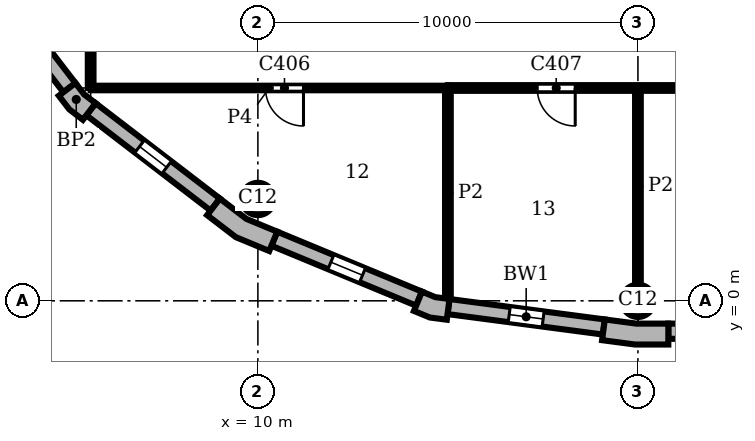
"""IFC4 building model, lengths in metres.
Left out: names, types, materials, properties, quantities, classifications, styles, units other than length and angle.
Written with IfcOpenShell. Run it as: python <this file> out.ifc"""

import sys

from ifc_helpers import new_model, si_unit, direction, frame, frame_2d, origin, origin_2d, place, context, subcontext, project, spatial, polyline, rectangle, circle, outline, extrude, element, fill, save


model = new_model("IFC4")
c1 = context("Model", 3, precision=1e-05, world=origin(), true_north=direction((0.0, 1.0)))
c2 = subcontext(c1, "Body", "Model", "MODEL_VIEW")
j1 = project(units=[si_unit("LENGTHUNIT", "METRE"), si_unit("PLANEANGLEUNIT", "RADIAN")], contexts=[c1])
p1 = place(None, origin())
s1 = spatial("IfcSite", under=j1, at=p1, CompositionType="ELEMENT")
p2 = place(p1, origin())
s2 = spatial("IfcBuilding", under=s1, at=p2, CompositionType="ELEMENT")
p3 = place(p2, frame((0.0, 0.0, 278.7)))
s3 = spatial("IfcBuildingStorey", under=s2, at=p3, CompositionType="ELEMENT", Elevation=278.7)
for number, where, z_axis, x_axis in (
    (1, (20.0, 0.0, 0.0), (0.0, 0.0, 1.0), (1.0, 0.0, 0.0)),
    (2, (10.0, 2.679, 0.0), (0.0, 0.0, 1.0), (1.0, 0.0, 0.0)),
):
    element("IfcColumn", number, at=place(p3, frame(where, z_axis=z_axis, x_axis=x_axis)), inside=s3, PredefinedType="COLUMN", context=c2, shape_type="SweptSolid", body=[
        extrude(circle(Radius=0.425, at=origin_2d()), origin(), (0.0, 0.0, 1.0), 3.9),
    ])
p4 = place(p3, origin())
e3 = element("IfcWall", 3, at=p4, inside=s3, PredefinedType="SOLIDWALL", context=c2, shape_type="SweptSolid", body=[
    extrude(outline(polyline([(19.076, -0.887), (19.057, -1.036), (19.925, -1.15), (20.8, -1.15), (20.8, -1.0), (20.8, -0.6), (19.961, -0.6), (19.128, -0.49), (19.076, -0.887)])), origin(), (0.0, 0.0, 1.0), 3.9),
])
e4 = element("IfcWall", 4, at=p4, inside=s3, PredefinedType="SOLIDWALL", context=c2, shape_type="SweptSolid", body=[
    extrude(outline(polyline([(4.882, 5.487), (4.763, 5.396), (5.038, 5.038), (5.396, 4.763), (5.487, 4.882), (5.731, 5.199), (5.43, 5.43), (5.199, 5.731), (4.882, 5.487)])), origin(), (0.0, 0.0, 1.0), 3.9),
])
e5 = element("IfcWall", 5, at=p4, inside=s3, PredefinedType="SOLIDWALL", context=c2, shape_type="SweptSolid", body=[
    extrude(outline(polyline([(8.757, 2.373), (8.665, 2.254), (9.42, 1.675), (10.299, 1.311), (10.356, 1.449), (10.51, 1.819), (9.698, 2.155), (9.0, 2.69), (8.757, 2.373)])), origin(), (0.0, 0.0, 1.0), 3.9),
])
e6 = element("IfcWall", 6, at=p4, inside=s3, PredefinedType="SOLIDWALL", context=c2, shape_type="SweptSolid", body=[
    extrude(outline(polyline([(14.164, -0.128), (14.106, -0.266), (14.523, -0.439), (14.971, -0.498), (14.99, -0.349), (15.043, 0.047), (14.667, 0.097), (14.317, 0.242), (14.164, -0.128)])), origin(), (0.0, 0.0, 1.0), 3.9),
])
p5 = place(p3, frame((20.8, -0.8, 0.0), z_axis=(0.0, 0.0, 1.0), x_axis=(1.0, 0.0, 0.0)))
e7 = element("IfcWall", 7, at=p5, inside=s3, PredefinedType="SOLIDWALL", context=c2, shape_type="SweptSolid", body=[
    extrude(rectangle(XDim=18.4, YDim=0.4, at=frame_2d((9.2, 0.0))), origin(), (0.0, 0.0, 1.0), 3.9),
])
p6 = place(p5, frame((3.75, 0.0, 0.9)))
e8 = element("IfcOpeningElement", 8, at=p6, cuts=e7, PredefinedType="OPENING", context=c2, shape_type="SweptSolid", body=[
    extrude(rectangle(XDim=0.9, YDim=2.35, at=frame_2d((0.45, 1.175))), frame((0.0, 0.21, 0.0), z_axis=(0.0, -1.0, 0.0), x_axis=(1.0, 0.0, 0.0)), (0.0, 0.0, 1.0), 0.42),
])
p7 = place(p5, frame((13.75, 0.0, 0.9)))
e9 = element("IfcOpeningElement", 9, at=p7, cuts=e7, PredefinedType="OPENING", context=c2, shape_type="SweptSolid", body=[
    extrude(rectangle(XDim=0.9, YDim=2.35, at=frame_2d((0.45, 1.175))), frame((0.0, 0.21, 0.0), z_axis=(0.0, -1.0, 0.0), x_axis=(1.0, 0.0, 0.0)), (0.0, 0.0, 1.0), 0.42),
])
p8 = place(p3, frame((2.532, 8.878, 0.0), z_axis=(0.0, 0.0, 1.0), x_axis=(0.608759824817, -0.793354571229, 0.0)))
e10 = element("IfcWall", 10, at=p8, inside=s3, PredefinedType="SOLIDWALL", context=c2, shape_type="SweptSolid", body=[
    extrude(rectangle(XDim=4.121, YDim=0.4, at=frame_2d((2.061, 0.0))), origin(), (0.0, 0.0, 1.0), 3.9),
])
p9 = place(p8, frame((1.611, 0.0, 0.9)))
e11 = element("IfcOpeningElement", 11, at=p9, cuts=e10, PredefinedType="OPENING", context=c2, shape_type="SweptSolid", body=[
    extrude(rectangle(XDim=0.9, YDim=2.35, at=frame_2d((0.45, 1.175))), frame((0.0, 0.21, 0.0), z_axis=(0.0, -1.0, 0.0), x_axis=(1.0, 0.0, 0.0)), (0.0, 0.0, 1.0), 0.42),
])
p10 = place(p3, frame((5.609, 5.041, 0.0), z_axis=(0.0, 0.0, 1.0), x_axis=(0.793354571229, -0.608759824817, 0.0)))
e12 = element("IfcWall", 12, at=p10, inside=s3, PredefinedType="SOLIDWALL", context=c2, shape_type="SweptSolid", body=[
    extrude(rectangle(XDim=4.121, YDim=0.4, at=frame_2d((2.061, 0.0))), origin(), (0.0, 0.0, 1.0), 3.9),
])
p11 = place(p10, frame((1.611, 0.0, 0.9)))
e13 = element("IfcOpeningElement", 13, at=p11, cuts=e12, PredefinedType="OPENING", context=c2, shape_type="SweptSolid", body=[
    extrude(rectangle(XDim=0.9, YDim=2.35, at=frame_2d((0.45, 1.175))), frame((0.0, 0.21, 0.0), z_axis=(0.0, -1.0, 0.0), x_axis=(1.0, 0.0, 0.0)), (0.0, 0.0, 1.0), 0.42),
])
p12 = place(p3, frame((10.433, 1.634, 0.0), z_axis=(0.0, 0.0, 1.0), x_axis=(0.923863744394, -0.382721546029, 0.0)))
e14 = element("IfcWall", 14, at=p12, inside=s3, PredefinedType="SOLIDWALL", context=c2, shape_type="SweptSolid", body=[
    extrude(rectangle(XDim=4.121, YDim=0.4, at=frame_2d((2.061, 0.0))), origin(), (0.0, 0.0, 1.0), 3.9),
])
p13 = place(p12, frame((1.611, 0.0, 0.9)))
e15 = element("IfcOpeningElement", 15, at=p13, cuts=e14, PredefinedType="OPENING", context=c2, shape_type="SweptSolid", body=[
    extrude(rectangle(XDim=0.9, YDim=2.35, at=frame_2d((0.45, 1.175))), frame((0.0, 0.21, 0.0), z_axis=(0.0, -1.0, 0.0), x_axis=(1.0, 0.0, 0.0)), (0.0, 0.0, 1.0), 0.42),
])
p14 = place(p3, frame((15.017, -0.151, 0.0), z_axis=(0.0, 0.0, 1.0), x_axis=(0.991446429508, -0.130514280502, 0.0)))
e16 = element("IfcWall", 16, at=p14, inside=s3, PredefinedType="SOLIDWALL", context=c2, shape_type="SweptSolid", body=[
    extrude(rectangle(XDim=4.121, YDim=0.4, at=frame_2d((2.061, 0.0))), origin(), (0.0, 0.0, 1.0), 3.9),
])
p15 = place(p14, frame((1.611, 0.0, 0.9)))
e17 = element("IfcOpeningElement", 17, at=p15, cuts=e16, PredefinedType="OPENING", context=c2, shape_type="SweptSolid", body=[
    extrude(rectangle(XDim=0.9, YDim=2.35, at=frame_2d((0.45, 1.175))), frame((0.0, 0.21, 0.0), z_axis=(0.0, -1.0, 0.0), x_axis=(1.0, 0.0, 0.0)), (0.0, 0.0, 1.0), 0.42),
])
p16 = place(p3, frame((5.6, 5.6, 0.0), z_axis=(0.0, 0.0, 1.0), x_axis=(0.0, 1.0, 0.0)))
e18 = element("IfcWall", 18, at=p16, inside=s3, PredefinedType="PARTITIONING", context=c2, shape_type="SweptSolid", body=[
    extrude(rectangle(XDim=14.4, YDim=0.15, at=frame_2d((7.2, 0.0))), origin(), (0.0, 0.0, 1.0), 3.58),
])
p17 = place(p16, frame((3.6, 0.0, 0.0)))
e19 = element("IfcOpeningElement", 19, at=p17, cuts=e18, PredefinedType="OPENING", context=c2, shape_type="SweptSolid", body=[
    extrude(rectangle(XDim=1.0, YDim=2.1, at=frame_2d((0.5, 1.05))), frame((0.0, 0.085, 0.0), z_axis=(0.0, -1.0, 0.0), x_axis=(1.0, 0.0, 0.0)), (0.0, 0.0, 1.0), 0.17),
])
p18 = place(p16, frame((11.25, 0.0, 0.0)))
e20 = element("IfcOpeningElement", 20, at=p18, cuts=e18, PredefinedType="OPENING", context=c2, shape_type="SweptSolid", body=[
    extrude(rectangle(XDim=0.8, YDim=2.1, at=frame_2d((0.4, 1.05))), frame((0.0, 0.085, 0.0), z_axis=(0.0, -1.0, 0.0), x_axis=(1.0, 0.0, 0.0)), (0.0, 0.0, 1.0), 0.17),
])
p19 = place(p3, frame((15.0, 0.063, 0.0), z_axis=(0.0, 0.0, 1.0), x_axis=(0.0, 1.0, 0.0)))
e21 = element("IfcWall", 21, at=p19, inside=s3, PredefinedType="PARTITIONING", context=c2, shape_type="SweptSolid", body=[
    extrude(rectangle(XDim=5.537, YDim=0.15, at=frame_2d((2.769, 0.0))), origin(), (0.0, 0.0, 1.0), 3.58),
])
p20 = place(p3, frame((20.0, 0.425, 0.0), z_axis=(0.0, 0.0, 1.0), x_axis=(0.0, 1.0, 0.0)))
e22 = element("IfcWall", 22, at=p20, inside=s3, PredefinedType="PARTITIONING", context=c2, shape_type="SweptSolid", body=[
    extrude(rectangle(XDim=5.175, YDim=0.15, at=frame_2d((2.587, 0.0))), origin(), (0.0, 0.0, 1.0), 3.58),
])
p21 = place(p3, frame((15.0, 5.6, 0.0), z_axis=(0.0, 0.0, 1.0), x_axis=(1.0, 0.0, 0.0)))
e23 = element("IfcWall", 23, at=p21, inside=s3, PredefinedType="PARTITIONING", context=c2, shape_type="SweptSolid", body=[
    extrude(rectangle(XDim=16.0, YDim=0.15, at=frame_2d((8.0, 0.0))), origin(), (0.0, 0.0, 1.0), 3.58),
])
p22 = place(p21, frame((2.35, 0.0, 0.0)))
e24 = element("IfcOpeningElement", 24, at=p22, cuts=e23, PredefinedType="OPENING", context=c2, shape_type="SweptSolid", body=[
    extrude(rectangle(XDim=1.0, YDim=2.1, at=frame_2d((0.5, 1.05))), frame((0.0, 0.085, 0.0), z_axis=(0.0, -1.0, 0.0), x_axis=(1.0, 0.0, 0.0)), (0.0, 0.0, 1.0), 0.17),
])
p23 = place(p3, frame((5.6, 5.6, 0.0), z_axis=(0.0, 0.0, 1.0), x_axis=(1.0, 0.0, 0.0)))
e25 = element("IfcWall", 25, at=p23, inside=s3, PredefinedType="PARTITIONING", context=c2, shape_type="SweptSolid", body=[
    extrude(rectangle(XDim=9.4, YDim=0.12, at=frame_2d((4.7, 0.0))), origin(), (0.0, 0.0, 1.0), 3.58),
])
p24 = place(p23, frame((4.6, 0.0, 0.0)))
e26 = element("IfcOpeningElement", 26, at=p24, cuts=e25, PredefinedType="OPENING", context=c2, shape_type="SweptSolid", body=[
    extrude(rectangle(XDim=1.0, YDim=2.1, at=frame_2d((0.5, 1.05))), frame((0.0, 0.07, 0.0), z_axis=(0.0, -1.0, 0.0), x_axis=(1.0, 0.0, 0.0)), (0.0, 0.0, 1.0), 0.14),
])
p25 = place(p11, origin())
e27 = element("IfcWindow", 27, at=p25, inside=s3, PartitioningType="SINGLE_PANEL", PredefinedType="WINDOW", context=c2, shape_type="SweptSolid", body=[
    extrude(rectangle(XDim=0.9, YDim=2.35, at=frame_2d((0.45, 1.175))), frame((0.0, 0.16, 0.0), z_axis=(0.0, -1.0, 0.0), x_axis=(1.0, 0.0, 0.0)), (0.0, 0.0, 1.0), 0.06),
])
fill(e13, e27)
p26 = place(p13, origin())
e28 = element("IfcWindow", 28, at=p26, inside=s3, PartitioningType="SINGLE_PANEL", PredefinedType="WINDOW", context=c2, shape_type="SweptSolid", body=[
    extrude(rectangle(XDim=0.9, YDim=2.35, at=frame_2d((0.45, 1.175))), frame((0.0, 0.16, 0.0), z_axis=(0.0, -1.0, 0.0), x_axis=(1.0, 0.0, 0.0)), (0.0, 0.0, 1.0), 0.06),
])
fill(e15, e28)
p27 = place(p15, origin())
e29 = element("IfcWindow", 29, at=p27, inside=s3, PartitioningType="SINGLE_PANEL", PredefinedType="WINDOW", context=c2, shape_type="SweptSolid", body=[
    extrude(rectangle(XDim=0.9, YDim=2.35, at=frame_2d((0.45, 1.175))), frame((0.0, 0.16, 0.0), z_axis=(0.0, -1.0, 0.0), x_axis=(1.0, 0.0, 0.0)), (0.0, 0.0, 1.0), 0.06),
])
fill(e17, e29)
p28 = place(p24, frame((1.0, 0.0, 0.0), z_axis=(0.0, 0.0, 1.0), x_axis=(-1.0, 0.0, 0.0)))
e30 = element("IfcDoor", 30, at=p28, inside=s3, OperationType="SINGLE_SWING_LEFT", PredefinedType="DOOR", context=c2, shape_type="SweptSolid", body=[
    extrude(rectangle(XDim=1.0, YDim=2.1, at=frame_2d((0.5, 1.05))), frame((0.0, 0.025, 0.0), z_axis=(0.0, -1.0, 0.0), x_axis=(1.0, 0.0, 0.0)), (0.0, 0.0, 1.0), 0.05),
])
fill(e26, e30)
p29 = place(p22, frame((1.0, 0.0, 0.0), z_axis=(0.0, 0.0, 1.0), x_axis=(-1.0, 0.0, 0.0)))
e31 = element("IfcDoor", 31, at=p29, inside=s3, OperationType="SINGLE_SWING_LEFT", PredefinedType="DOOR", context=c2, shape_type="SweptSolid", body=[
    extrude(rectangle(XDim=1.0, YDim=2.1, at=frame_2d((0.5, 1.05))), frame((0.0, 0.025, 0.0), z_axis=(0.0, -1.0, 0.0), x_axis=(1.0, 0.0, 0.0)), (0.0, 0.0, 1.0), 0.05),
])
fill(e24, e31)
save(model, sys.argv[1])
